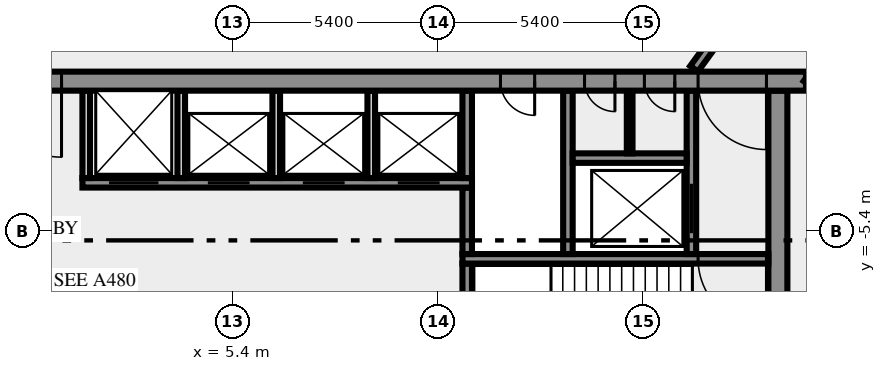
"""IFC4 building model, lengths in metres.
Left out: names, types, materials, properties, quantities, classifications, styles, units other than length and angle.
Written with IfcOpenShell. Run it as: python <this file> out.ifc"""

import sys

from ifc_helpers import new_model, si_unit, direction, frame, frame_2d, origin, place, context, subcontext, project, spatial, rectangle, extrude, element, fill, save


model = new_model("IFC4")
c1 = context("Model", 3, precision=1e-05, world=origin(), true_north=direction((0.0, 1.0)))
c2 = subcontext(c1, "Body", "Model", "MODEL_VIEW")
j1 = project(units=[si_unit("LENGTHUNIT", "METRE"), si_unit("PLANEANGLEUNIT", "RADIAN")], contexts=[c1])
p1 = place(None, origin())
s1 = spatial("IfcSite", under=j1, at=p1, CompositionType="ELEMENT")
p2 = place(p1, origin())
s2 = spatial("IfcBuilding", under=s1, at=p2, CompositionType="ELEMENT")
p3 = place(p2, frame((0.0, 0.0, 152.0)))
s3 = spatial("IfcBuildingStorey", under=s2, at=p3, CompositionType="ELEMENT", Elevation=152.0)
p4 = place(p3, frame((19.75, -10.5, 0.0), z_axis=(0.0, 0.0, 1.0), x_axis=(0.0, 1.0, 0.0)))
e1 = element("IfcWall", 1, at=p4, inside=s3, PredefinedType="SHEAR", context=c2, shape_type="SweptSolid", body=[
    extrude(rectangle(XDim=8.8, YDim=0.5, at=frame_2d((4.4, 0.0))), origin(), (0.0, 0.0, 1.0), 3.65),
])
p5 = place(p3, frame((11.575, -7.25, 0.0), z_axis=(0.0, 0.0, 1.0), x_axis=(0.0, 1.0, 0.0)))
e2 = element("IfcWall", 2, at=p5, inside=s3, PredefinedType="SHEAR", context=c2, shape_type="SweptSolid", body=[
    extrude(rectangle(XDim=1.0, YDim=0.25, at=frame_2d((0.5, 0.0))), origin(), (0.0, 0.0, 1.0), 3.65),
])
p6 = place(p3, frame((19.5, -6.125, 0.0), z_axis=(0.0, 0.0, 1.0), x_axis=(-1.0, 0.0, 0.0)))
e3 = element("IfcWall", 3, at=p6, inside=s3, PredefinedType="SHEAR", context=c2, shape_type="SweptSolid", body=[
    extrude(rectangle(XDim=8.05, YDim=0.25, at=frame_2d((4.025, 0.0))), origin(), (0.0, 0.0, 1.0), 3.65),
])
p7 = place(p6, frame((0.05, 0.0, 0.0)))
e4 = element("IfcOpeningElement", 4, at=p7, cuts=e3, PredefinedType="OPENING", context=c2, shape_type="SweptSolid", body=[
    extrude(rectangle(XDim=1.8, YDim=2.1, at=frame_2d((0.9, 1.05))), frame((0.0, 0.135, 0.0), z_axis=(0.0, -1.0, 0.0), x_axis=(1.0, 0.0, 0.0)), (0.0, 0.0, 1.0), 0.27),
])
p8 = place(p3, frame((11.575, -6.0, 0.0), z_axis=(0.0, 0.0, 1.0), x_axis=(0.0, 1.0, 0.0)))
e5 = element("IfcWall", 5, at=p8, inside=s3, PredefinedType="SHEAR", context=c2, shape_type="SweptSolid", body=[
    extrude(rectangle(XDim=1.75, YDim=0.25, at=frame_2d((0.875, 0.0))), origin(), (0.0, 0.0, 1.0), 3.65),
])
p9 = place(p3, frame((14.225, -6.0, 0.0), z_axis=(0.0, 0.0, 1.0), x_axis=(0.0, 1.0, 0.0)))
e6 = element("IfcWall", 6, at=p9, inside=s3, PredefinedType="SHEAR", context=c2, shape_type="SweptSolid", body=[
    extrude(rectangle(XDim=4.3, YDim=0.25, at=frame_2d((2.15, 0.0))), origin(), (0.0, 0.0, 1.0), 3.65),
])
p10 = place(p3, frame((17.475, -6.0, 0.0), z_axis=(0.0, 0.0, 1.0), x_axis=(0.0, 1.0, 0.0)))
e7 = element("IfcWall", 7, at=p10, inside=s3, PredefinedType="SHEAR", context=c2, shape_type="SweptSolid", body=[
    extrude(rectangle(XDim=4.3, YDim=0.25, at=frame_2d((2.15, 0.0))), origin(), (0.0, 0.0, 1.0), 3.65),
])
p11 = place(p10, frame((0.55, 0.0, 0.0)))
e8 = element("IfcOpeningElement", 8, at=p11, cuts=e7, PredefinedType="OPENING", context=c2, shape_type="SweptSolid", body=[
    extrude(rectangle(XDim=1.3, YDim=2.1, at=frame_2d((0.65, 1.05))), frame((0.0, 0.135, 0.0), z_axis=(0.0, -1.0, 0.0), x_axis=(1.0, 0.0, 0.0)), (0.0, 0.0, 1.0), 0.27),
])
p12 = place(p3, frame((1.45, -4.125, 0.0), z_axis=(0.0, 0.0, 1.0), x_axis=(1.0, 0.0, 0.0)))
e9 = element("IfcWall", 9, at=p12, inside=s3, PredefinedType="SHEAR", context=c2, shape_type="SweptSolid", body=[
    extrude(rectangle(XDim=10.25, YDim=0.25, at=frame_2d((5.125, 0.0))), origin(), (0.0, 0.0, 1.0), 3.65),
])
p13 = place(p12, frame((0.7, 0.0, 0.0)))
e10 = element("IfcOpeningElement", 10, at=p13, cuts=e9, PredefinedType="OPENING", context=c2, shape_type="SweptSolid", body=[
    extrude(rectangle(XDim=1.3, YDim=2.1, at=frame_2d((0.65, 1.05))), frame((0.0, 0.135, 0.0), z_axis=(0.0, -1.0, 0.0), x_axis=(1.0, 0.0, 0.0)), (0.0, 0.0, 1.0), 0.27),
])
p14 = place(p12, frame((3.3, 0.0, 0.0)))
e11 = element("IfcOpeningElement", 11, at=p14, cuts=e9, PredefinedType="OPENING", context=c2, shape_type="SweptSolid", body=[
    extrude(rectangle(XDim=1.1, YDim=2.1, at=frame_2d((0.55, 1.05))), frame((0.0, 0.135, 0.0), z_axis=(0.0, -1.0, 0.0), x_axis=(1.0, 0.0, 0.0)), (0.0, 0.0, 1.0), 0.27),
])
p15 = place(p12, frame((5.8, 0.0, 0.0)))
e12 = element("IfcOpeningElement", 12, at=p15, cuts=e9, PredefinedType="OPENING", context=c2, shape_type="SweptSolid", body=[
    extrude(rectangle(XDim=1.1, YDim=2.1, at=frame_2d((0.55, 1.05))), frame((0.0, 0.135, 0.0), z_axis=(0.0, -1.0, 0.0), x_axis=(1.0, 0.0, 0.0)), (0.0, 0.0, 1.0), 0.27),
])
p16 = place(p12, frame((8.3, 0.0, 0.0)))
e13 = element("IfcOpeningElement", 13, at=p16, cuts=e9, PredefinedType="OPENING", context=c2, shape_type="SweptSolid", body=[
    extrude(rectangle(XDim=1.1, YDim=2.1, at=frame_2d((0.55, 1.05))), frame((0.0, 0.135, 0.0), z_axis=(0.0, -1.0, 0.0), x_axis=(1.0, 0.0, 0.0)), (0.0, 0.0, 1.0), 0.27),
])
for number, where, z_axis, x_axis in (
    (14, (1.55, -4.0, 0.0), (0.0, 0.0, 1.0), (0.0, 1.0, 0.0)),
    (15, (4.05, -4.0, 0.0), (0.0, 0.0, 1.0), (0.0, 1.0, 0.0)),
    (16, (6.55, -4.0, 0.0), (0.0, 0.0, 1.0), (0.0, 1.0, 0.0)),
    (17, (9.05, -4.0, 0.0), (0.0, 0.0, 1.0), (0.0, 1.0, 0.0)),
):
    element("IfcWall", number, at=place(p3, frame(where, z_axis=z_axis, x_axis=x_axis)), inside=s3, PredefinedType="SOLIDWALL", context=c2, shape_type="SweptSolid", body=[
        extrude(rectangle(XDim=2.3, YDim=0.2, at=frame_2d((1.15, 0.0))), origin(), (0.0, 0.0, 1.0), 3.65),
    ])
p17 = place(p3, frame((11.575, -4.0, 0.0), z_axis=(0.0, 0.0, 1.0), x_axis=(0.0, 1.0, 0.0)))
e18 = element("IfcWall", 18, at=p17, inside=s3, PredefinedType="SHEAR", context=c2, shape_type="SweptSolid", body=[
    extrude(rectangle(XDim=2.3, YDim=0.25, at=frame_2d((1.15, 0.0))), origin(), (0.0, 0.0, 1.0), 3.65),
])
p18 = place(p3, frame((14.35, -3.475, 0.0), z_axis=(0.0, 0.0, 1.0), x_axis=(1.0, 0.0, 0.0)))
e19 = element("IfcWall", 19, at=p18, inside=s3, PredefinedType="SHEAR", context=c2, shape_type="SweptSolid", body=[
    extrude(rectangle(XDim=3.0, YDim=0.25, at=frame_2d((1.5, 0.0))), origin(), (0.0, 0.0, 1.0), 3.65),
])
p19 = place(p3, frame((15.85, -3.35, 0.0), z_axis=(0.0, 0.0, 1.0), x_axis=(0.0, 1.0, 0.0)))
e20 = element("IfcWall", 20, at=p19, inside=s3, PredefinedType="PARTITIONING", context=c2, shape_type="SweptSolid", body=[
    extrude(rectangle(XDim=1.65, YDim=0.15, at=frame_2d((0.825, 0.0))), origin(), (0.0, 0.0, 1.0), 3.65),
])
p20 = place(p3, frame((20.49, -1.45, 0.0), z_axis=(0.0, 0.0, 1.0), x_axis=(-1.0, 0.0, 0.0)))
e21 = element("IfcWall", 21, at=p20, inside=s3, PredefinedType="SHEAR", context=c2, shape_type="SweptSolid", body=[
    extrude(rectangle(XDim=40.98, YDim=0.5, at=frame_2d((20.49, 0.0))), origin(), (0.0, 0.0, 1.0), 3.65),
])
p21 = place(p20, frame((38.14, 0.0, 0.0)))
e22 = element("IfcOpeningElement", 22, at=p21, cuts=e21, PredefinedType="OPENING", context=c2, shape_type="SweptSolid", body=[
    extrude(rectangle(XDim=1.8, YDim=2.1, at=frame_2d((0.9, 1.05))), frame((0.0, 0.26, 0.0), z_axis=(0.0, -1.0, 0.0), x_axis=(1.0, 0.0, 0.0)), (0.0, 0.0, 1.0), 0.52),
])
p22 = place(p20, frame((35.89, 0.0, 0.0)))
e23 = element("IfcOpeningElement", 23, at=p22, cuts=e21, PredefinedType="OPENING", context=c2, shape_type="SweptSolid", body=[
    extrude(rectangle(XDim=0.9, YDim=2.1, at=frame_2d((0.45, 1.05))), frame((0.0, 0.26, 0.0), z_axis=(0.0, -1.0, 0.0), x_axis=(1.0, 0.0, 0.0)), (0.0, 0.0, 1.0), 0.52),
])
p23 = place(p20, frame((32.94, 0.0, 0.0)))
e24 = element("IfcOpeningElement", 24, at=p23, cuts=e21, PredefinedType="OPENING", context=c2, shape_type="SweptSolid", body=[
    extrude(rectangle(XDim=0.9, YDim=2.1, at=frame_2d((0.45, 1.05))), frame((0.0, 0.26, 0.0), z_axis=(0.0, -1.0, 0.0), x_axis=(1.0, 0.0, 0.0)), (0.0, 0.0, 1.0), 0.52),
])
p24 = place(p20, frame((29.802, 0.0, 0.0)))
e25 = element("IfcOpeningElement", 25, at=p24, cuts=e21, PredefinedType="OPENING", context=c2, shape_type="SweptSolid", body=[
    extrude(rectangle(XDim=0.9, YDim=2.1, at=frame_2d((0.45, 1.05))), frame((0.0, 0.26, 0.0), z_axis=(0.0, -1.0, 0.0), x_axis=(1.0, 0.0, 0.0)), (0.0, 0.0, 1.0), 0.52),
])
p25 = place(p20, frame((26.077, 0.0, 0.0)))
e26 = element("IfcOpeningElement", 26, at=p25, cuts=e21, PredefinedType="OPENING", context=c2, shape_type="SweptSolid", body=[
    extrude(rectangle(XDim=0.9, YDim=2.1, at=frame_2d((0.45, 1.05))), frame((0.0, 0.26, 0.0), z_axis=(0.0, -1.0, 0.0), x_axis=(1.0, 0.0, 0.0)), (0.0, 0.0, 1.0), 0.52),
])
p26 = place(p20, frame((19.59, 0.0, 0.0)))
e27 = element("IfcOpeningElement", 27, at=p26, cuts=e21, PredefinedType="OPENING", context=c2, shape_type="SweptSolid", body=[
    extrude(rectangle(XDim=2.0, YDim=2.1, at=frame_2d((1.0, 1.05))), frame((0.0, 0.26, 0.0), z_axis=(0.0, -1.0, 0.0), x_axis=(1.0, 0.0, 0.0)), (0.0, 0.0, 1.0), 0.52),
])
p27 = place(p20, frame((7.14, 0.0, 0.0)))
e28 = element("IfcOpeningElement", 28, at=p27, cuts=e21, PredefinedType="OPENING", context=c2, shape_type="SweptSolid", body=[
    extrude(rectangle(XDim=0.9, YDim=2.1, at=frame_2d((0.45, 1.05))), frame((0.0, 0.26, 0.0), z_axis=(0.0, -1.0, 0.0), x_axis=(1.0, 0.0, 0.0)), (0.0, 0.0, 1.0), 0.52),
])
p28 = place(p20, frame((5.028, 0.0, 0.0)))
e29 = element("IfcOpeningElement", 29, at=p28, cuts=e21, PredefinedType="OPENING", context=c2, shape_type="SweptSolid", body=[
    extrude(rectangle(XDim=0.8, YDim=2.1, at=frame_2d((0.4, 1.05))), frame((0.0, 0.26, 0.0), z_axis=(0.0, -1.0, 0.0), x_axis=(1.0, 0.0, 0.0)), (0.0, 0.0, 1.0), 0.52),
])
p29 = place(p20, frame((3.452, 0.0, 0.0)))
e30 = element("IfcOpeningElement", 30, at=p29, cuts=e21, PredefinedType="OPENING", context=c2, shape_type="SweptSolid", body=[
    extrude(rectangle(XDim=0.8, YDim=2.1, at=frame_2d((0.4, 1.05))), frame((0.0, 0.26, 0.0), z_axis=(0.0, -1.0, 0.0), x_axis=(1.0, 0.0, 0.0)), (0.0, 0.0, 1.0), 0.52),
])
p30 = place(p20, frame((1.04, 0.0, 0.0)))
e31 = element("IfcOpeningElement", 31, at=p30, cuts=e21, PredefinedType="OPENING", context=c2, shape_type="SweptSolid", body=[
    extrude(rectangle(XDim=1.8, YDim=2.1, at=frame_2d((0.9, 1.05))), frame((0.0, 0.26, 0.0), z_axis=(0.0, -1.0, 0.0), x_axis=(1.0, 0.0, 0.0)), (0.0, 0.0, 1.0), 0.52),
])
p31 = place(p3, frame((17.545, -1.125, 0.0), z_axis=(0.0, 0.0, 1.0), x_axis=(0.587786330937, 0.809016210693, 0.0)))
e32 = element("IfcWall", 32, at=p31, inside=s3, PredefinedType="SOLIDWALL", context=c2, shape_type="SweptSolid", body=[
    extrude(rectangle(XDim=30.103, YDim=0.25, at=frame_2d((15.052, 0.0))), origin(), (0.0, 0.0, 1.0), 3.65),
])
p32 = place(p31, frame((3.441, 0.0, 0.0)))
e33 = element("IfcOpeningElement", 33, at=p32, cuts=e32, PredefinedType="OPENING", context=c2, shape_type="SweptSolid", body=[
    extrude(rectangle(XDim=0.9, YDim=2.1, at=frame_2d((0.45, 1.05))), frame((0.0, 0.135, 0.0), z_axis=(0.0, -1.0, 0.0), x_axis=(1.0, 0.0, 0.0)), (0.0, 0.0, 1.0), 0.27),
])
p33 = place(p31, frame((20.457, 0.0, 0.0)))
e34 = element("IfcOpeningElement", 34, at=p33, cuts=e32, PredefinedType="OPENING", context=c2, shape_type="SweptSolid", body=[
    extrude(rectangle(XDim=0.9, YDim=2.1, at=frame_2d((0.45, 1.05))), frame((0.0, 0.135, 0.0), z_axis=(0.0, -1.0, 0.0), x_axis=(1.0, 0.0, 0.0)), (0.0, 0.0, 1.0), 0.27),
])
p34 = place(p31, frame((18.858, 0.0, 0.0)))
e35 = element("IfcOpeningElement", 35, at=p34, cuts=e32, PredefinedType="OPENING", context=c2, shape_type="SweptSolid", body=[
    extrude(rectangle(XDim=0.9, YDim=2.1, at=frame_2d((0.45, 1.05))), frame((0.0, 0.135, 0.0), z_axis=(0.0, -1.0, 0.0), x_axis=(1.0, 0.0, 0.0)), (0.0, 0.0, 1.0), 0.27),
])
p35 = place(p3, frame((37.236, 21.469, 0.0), z_axis=(0.0, 0.0, 1.0), x_axis=(-0.58778344073, -0.809018310549, 0.0)))
e36 = element("IfcWall", 36, at=p35, inside=s3, PredefinedType="SOLIDWALL", context=c2, shape_type="SweptSolid", body=[
    extrude(rectangle(XDim=28.42, YDim=0.25, at=frame_2d((14.21, 0.0))), origin(), (0.0, 0.0, 1.0), 3.65),
])
p36 = place(p35, frame((26.988, 0.0, 0.0)))
e37 = element("IfcOpeningElement", 37, at=p36, cuts=e36, PredefinedType="OPENING", context=c2, shape_type="SweptSolid", body=[
    extrude(rectangle(XDim=0.9, YDim=2.1, at=frame_2d((0.45, 1.05))), frame((0.0, 0.135, 0.0), z_axis=(0.0, -1.0, 0.0), x_axis=(1.0, 0.0, 0.0)), (0.0, 0.0, 1.0), 0.27),
])
p37 = place(p35, frame((0.224, 0.0, 0.0)))
e38 = element("IfcOpeningElement", 38, at=p37, cuts=e36, PredefinedType="OPENING", context=c2, shape_type="SweptSolid", body=[
    extrude(rectangle(XDim=0.9, YDim=2.1, at=frame_2d((0.45, 1.05))), frame((0.0, 0.135, 0.0), z_axis=(0.0, -1.0, 0.0), x_axis=(1.0, 0.0, 0.0)), (0.0, 0.0, 1.0), 0.27),
])
p38 = place(p35, frame((9.155, 0.0, 0.0)))
e39 = element("IfcOpeningElement", 39, at=p38, cuts=e36, PredefinedType="OPENING", context=c2, shape_type="SweptSolid", body=[
    extrude(rectangle(XDim=0.9, YDim=2.1, at=frame_2d((0.45, 1.05))), frame((0.0, 0.135, 0.0), z_axis=(0.0, -1.0, 0.0), x_axis=(1.0, 0.0, 0.0)), (0.0, 0.0, 1.0), 0.27),
])
p39 = place(p7, origin())
e40 = element("IfcDoor", 40, at=p39, inside=s3, OperationType="DOUBLE_DOOR_SINGLE_SWING", PredefinedType="DOOR", context=c2, shape_type="SweptSolid", body=[
    extrude(rectangle(XDim=1.8, YDim=2.1, at=frame_2d((0.9, 1.05))), frame((0.0, 0.025, 0.0), z_axis=(0.0, -1.0, 0.0), x_axis=(1.0, 0.0, 0.0)), (0.0, 0.0, 1.0), 0.05),
])
fill(e4, e40)
p40 = place(p11, origin())
e41 = element("IfcDoor", 41, at=p40, inside=s3, OperationType="DOUBLE_DOOR_SLIDING", PredefinedType="DOOR", context=c2, shape_type="SweptSolid", body=[
    extrude(rectangle(XDim=1.3, YDim=2.1, at=frame_2d((0.65, 1.05))), frame((0.0, 0.025, 0.0), z_axis=(0.0, -1.0, 0.0), x_axis=(1.0, 0.0, 0.0)), (0.0, 0.0, 1.0), 0.05),
])
fill(e8, e41)
p41 = place(p13, origin())
e42 = element("IfcDoor", 42, at=p41, inside=s3, OperationType="DOUBLE_DOOR_SLIDING", PredefinedType="DOOR", context=c2, shape_type="SweptSolid", body=[
    extrude(rectangle(XDim=1.3, YDim=2.1, at=frame_2d((0.65, 1.05))), frame((0.0, 0.025, 0.0), z_axis=(0.0, -1.0, 0.0), x_axis=(1.0, 0.0, 0.0)), (0.0, 0.0, 1.0), 0.05),
])
fill(e10, e42)
p42 = place(p14, origin())
e43 = element("IfcDoor", 43, at=p42, inside=s3, OperationType="DOUBLE_DOOR_SLIDING", PredefinedType="DOOR", context=c2, shape_type="SweptSolid", body=[
    extrude(rectangle(XDim=1.1, YDim=2.1, at=frame_2d((0.55, 1.05))), frame((0.0, 0.025, 0.0), z_axis=(0.0, -1.0, 0.0), x_axis=(1.0, 0.0, 0.0)), (0.0, 0.0, 1.0), 0.05),
])
fill(e11, e43)
p43 = place(p15, origin())
e44 = element("IfcDoor", 44, at=p43, inside=s3, OperationType="DOUBLE_DOOR_SLIDING", PredefinedType="DOOR", context=c2, shape_type="SweptSolid", body=[
    extrude(rectangle(XDim=1.1, YDim=2.1, at=frame_2d((0.55, 1.05))), frame((0.0, 0.025, 0.0), z_axis=(0.0, -1.0, 0.0), x_axis=(1.0, 0.0, 0.0)), (0.0, 0.0, 1.0), 0.05),
])
fill(e12, e44)
p44 = place(p16, origin())
e45 = element("IfcDoor", 45, at=p44, inside=s3, OperationType="DOUBLE_DOOR_SLIDING", PredefinedType="DOOR", context=c2, shape_type="SweptSolid", body=[
    extrude(rectangle(XDim=1.1, YDim=2.1, at=frame_2d((0.55, 1.05))), frame((0.0, 0.025, 0.0), z_axis=(0.0, -1.0, 0.0), x_axis=(1.0, 0.0, 0.0)), (0.0, 0.0, 1.0), 0.05),
])
fill(e13, e45)
p45 = place(p26, origin())
e46 = element("IfcDoor", 46, at=p45, inside=s3, OperationType="DOUBLE_DOOR_SINGLE_SWING", PredefinedType="DOOR", context=c2, shape_type="SweptSolid", body=[
    extrude(rectangle(XDim=2.0, YDim=2.1, at=frame_2d((1.0, 1.05))), frame((0.0, 0.025, 0.0), z_axis=(0.0, -1.0, 0.0), x_axis=(1.0, 0.0, 0.0)), (0.0, 0.0, 1.0), 0.05),
])
fill(e27, e46)
p46 = place(p27, origin())
e47 = element("IfcDoor", 47, at=p46, inside=s3, OperationType="SINGLE_SWING_LEFT", PredefinedType="DOOR", context=c2, shape_type="SweptSolid", body=[
    extrude(rectangle(XDim=0.9, YDim=2.1, at=frame_2d((0.45, 1.05))), frame((0.0, 0.025, 0.0), z_axis=(0.0, -1.0, 0.0), x_axis=(1.0, 0.0, 0.0)), (0.0, 0.0, 1.0), 0.05),
])
fill(e28, e47)
p47 = place(p28, origin())
e48 = element("IfcDoor", 48, at=p47, inside=s3, OperationType="SINGLE_SWING_LEFT", PredefinedType="DOOR", context=c2, shape_type="SweptSolid", body=[
    extrude(rectangle(XDim=0.8, YDim=2.1, at=frame_2d((0.4, 1.05))), frame((0.0, 0.025, 0.0), z_axis=(0.0, -1.0, 0.0), x_axis=(1.0, 0.0, 0.0)), (0.0, 0.0, 1.0), 0.05),
])
fill(e29, e48)
p48 = place(p29, origin())
e49 = element("IfcDoor", 49, at=p48, inside=s3, OperationType="SINGLE_SWING_LEFT", PredefinedType="DOOR", context=c2, shape_type="SweptSolid", body=[
    extrude(rectangle(XDim=0.8, YDim=2.1, at=frame_2d((0.4, 1.05))), frame((0.0, 0.025, 0.0), z_axis=(0.0, -1.0, 0.0), x_axis=(1.0, 0.0, 0.0)), (0.0, 0.0, 1.0), 0.05),
])
fill(e30, e49)
p49 = place(p30, origin())
e50 = element("IfcDoor", 50, at=p49, inside=s3, OperationType="DOUBLE_DOOR_SINGLE_SWING", PredefinedType="DOOR", context=c2, shape_type="SweptSolid", body=[
    extrude(rectangle(XDim=1.8, YDim=2.1, at=frame_2d((0.9, 1.05))), frame((0.0, 0.025, 0.0), z_axis=(0.0, -1.0, 0.0), x_axis=(1.0, 0.0, 0.0)), (0.0, 0.0, 1.0), 0.05),
])
fill(e31, e50)
save(model, sys.argv[1])
